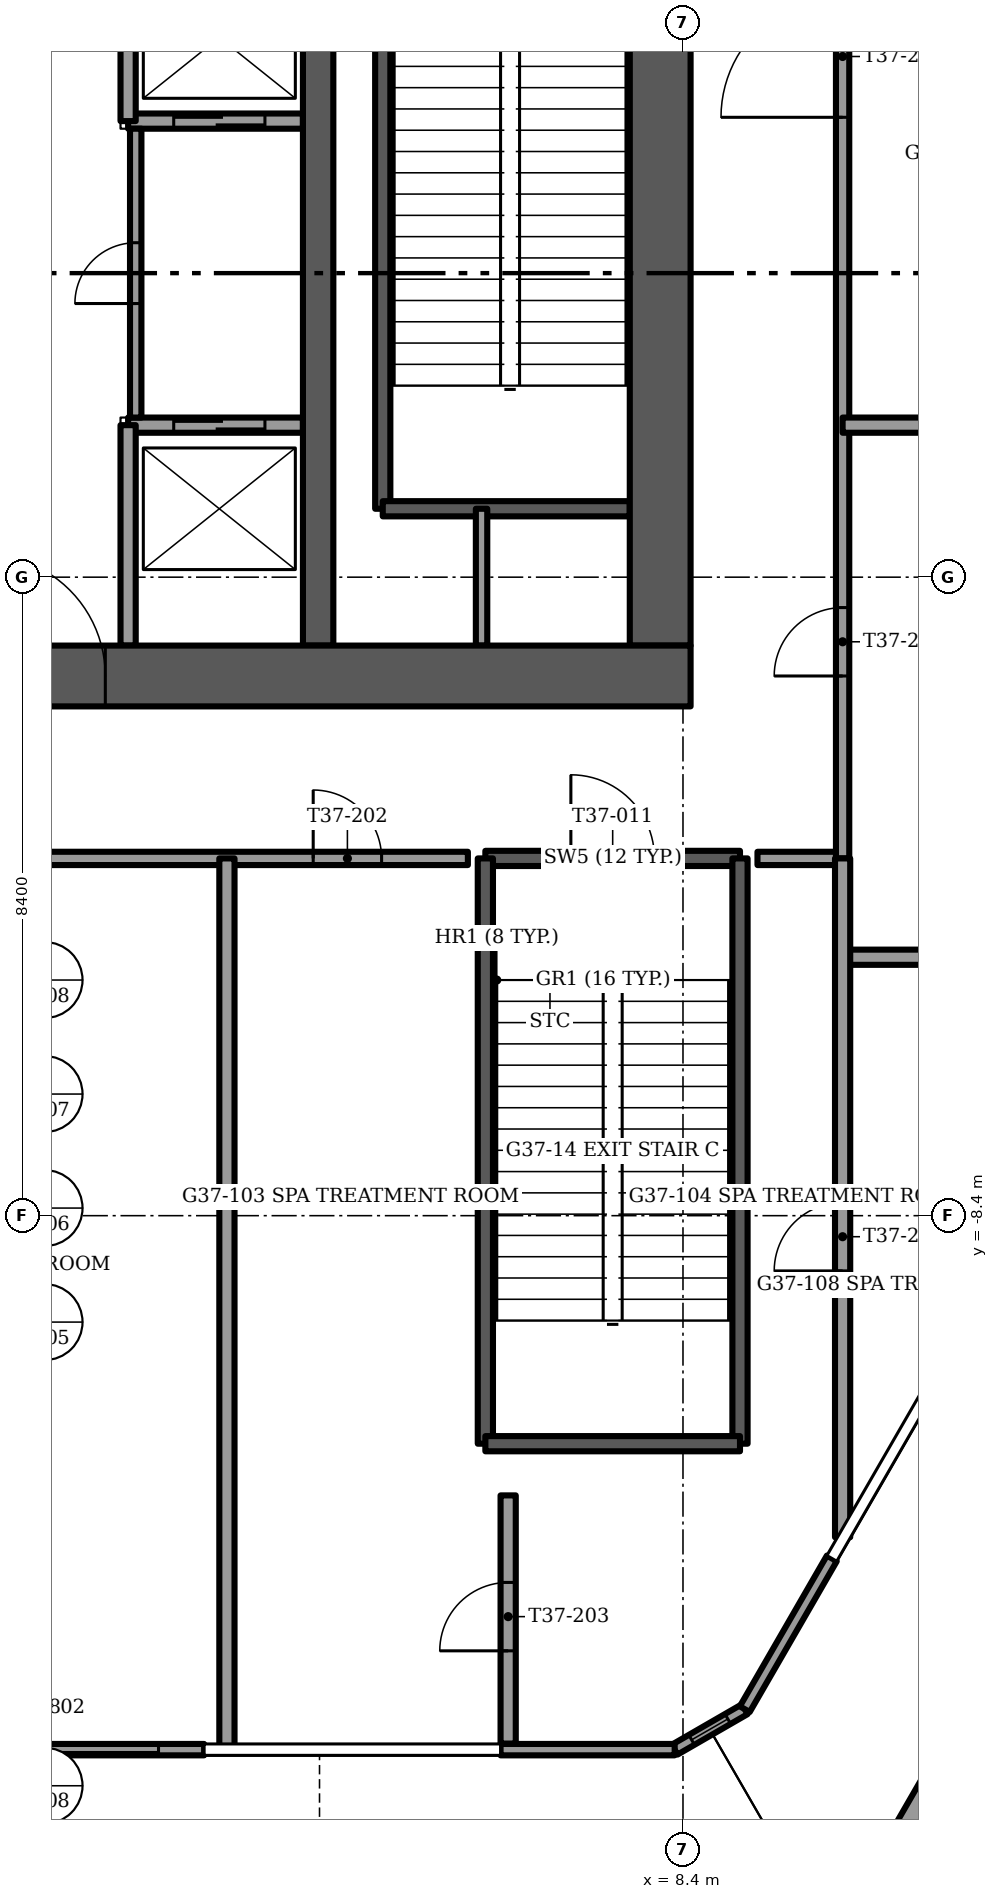
"""IFC4 building model, lengths in metres.
Left out: names, types, materials, properties, quantities, classifications, styles, units other than length and angle.
Written with IfcOpenShell. Run it as: python <this file> out.ifc"""

import sys

from ifc_helpers import new_model, si_unit, direction, frame, frame_2d, origin, place, context, subcontext, project, spatial, rectangle, extrude, element, fill, save


model = new_model("IFC4")
c1 = context("Model", 3, precision=1e-05, world=origin(), true_north=direction((0.0, 1.0)))
c2 = subcontext(c1, "Body", "Model", "MODEL_VIEW")
j1 = project(units=[si_unit("LENGTHUNIT", "METRE"), si_unit("PLANEANGLEUNIT", "RADIAN")], contexts=[c1])
p1 = place(None, origin())
s1 = spatial("IfcSite", under=j1, at=p1, CompositionType="ELEMENT")
p2 = place(p1, origin())
s2 = spatial("IfcBuilding", under=s1, at=p2, CompositionType="ELEMENT")
p3 = place(p2, frame((0.0, 0.0, 151.0)))
s3 = spatial("IfcBuildingStorey", under=s2, at=p3, CompositionType="ELEMENT", Elevation=151.0)
p4 = place(p3, frame((-8.5, -1.3, -0.3), z_axis=(0.0, 0.0, 1.0), x_axis=(1.0, 0.0, 0.0)))
e1 = element("IfcWall", 1, at=p4, inside=s3, PredefinedType="SHEAR", context=c2, shape_type="SweptSolid", body=[
    extrude(rectangle(XDim=17.0, YDim=0.8, at=frame_2d((8.5, 0.0))), origin(), (0.0, 0.0, 1.0), 6.0),
])
p5 = place(p4, frame((7.7, 0.0, 0.0)))
e2 = element("IfcOpeningElement", 2, at=p5, cuts=e1, PredefinedType="OPENING", context=c2, shape_type="SweptSolid", body=[
    extrude(rectangle(XDim=1.6, YDim=2.1, at=frame_2d((0.8, 1.05))), frame((0.0, 0.4, 0.0), z_axis=(0.0, -1.0, 0.0), x_axis=(1.0, 0.0, 0.0)), (0.0, 0.0, 1.0), 0.8),
])
p6 = place(p3, frame((8.1, -0.9, -0.3), z_axis=(0.0, 0.0, 1.0), x_axis=(0.0, 1.0, 0.0)))
e3 = element("IfcWall", 3, at=p6, inside=s3, PredefinedType="SHEAR", context=c2, shape_type="SweptSolid", body=[
    extrude(rectangle(XDim=9.8, YDim=0.8, at=frame_2d((4.9, 0.0))), origin(), (0.0, 0.0, 1.0), 6.0),
])
p7 = place(p6, frame((8.15, 0.0, 0.0)))
e4 = element("IfcOpeningElement", 4, at=p7, cuts=e3, PredefinedType="OPENING", context=c2, shape_type="SweptSolid", body=[
    extrude(rectangle(XDim=1.1, YDim=2.1, at=frame_2d((0.55, 1.05))), frame((0.0, 0.4, 0.0), z_axis=(0.0, -1.0, 0.0), x_axis=(1.0, 0.0, 0.0)), (0.0, 0.0, 1.0), 0.8),
])
p8 = place(p3, frame((3.6, -0.9, -0.3), z_axis=(0.0, 0.0, 1.0), x_axis=(0.0, 1.0, 0.0)))
e5 = element("IfcWall", 5, at=p8, inside=s3, PredefinedType="SHEAR", context=c2, shape_type="SweptSolid", body=[
    extrude(rectangle(XDim=9.8, YDim=0.4, at=frame_2d((4.9, 0.0))), origin(), (0.0, 0.0, 1.0), 6.0),
])
p9 = place(p3, frame((10.865, -17.88, 0.0), z_axis=(0.0, 0.0, 1.0), x_axis=(0.49998703478, 0.866032889128, 0.0)))
e6 = element("IfcWall", 6, at=p9, inside=s3, PredefinedType="PARAPET", context=c2, shape_type="SweptSolid", body=[
    extrude(rectangle(XDim=5.964, YDim=0.9, at=frame_2d((2.982, 0.0))), origin(), (0.0, 0.0, 1.0), 1.1),
])
p10 = place(p3, frame((-2.1, -15.425, 0.0), z_axis=(0.0, 0.0, 1.0), x_axis=(1.0, 0.0, 0.0)))
e7 = element("IfcWall", 7, at=p10, inside=s3, PredefinedType="SOLIDWALL", context=c2, shape_type="SweptSolid", body=[
    extrude(rectangle(XDim=4.2, YDim=0.15, at=frame_2d((2.1, 0.0))), origin(), (0.0, 0.0, 1.0), 5.7),
])
p11 = place(p10, frame((0.6, 0.0, 0.0)))
e8 = element("IfcOpeningElement", 8, at=p11, cuts=e7, PredefinedType="OPENING", context=c2, shape_type="SweptSolid", body=[
    extrude(rectangle(XDim=3.0, YDim=2.4, at=frame_2d((1.5, 1.2))), frame((0.0, 0.075, 0.0), z_axis=(0.0, -1.0, 0.0), x_axis=(1.0, 0.0, 0.0)), (0.0, 0.0, 1.0), 0.15),
])
for number, where, z_axis, x_axis in (
    (9, (6.0, -15.425, 0.0), (0.0, 0.0, 1.0), (1.0, 0.0, 0.0)),
    (10, (9.213, -14.893, 0.0), (0.0, 0.0, 1.0), (0.5, 0.866, 0.0)),
):
    element("IfcWall", number, at=place(p3, frame(where, z_axis=z_axis, x_axis=x_axis)), inside=s3, PredefinedType="SOLIDWALL", context=c2, shape_type="SweptSolid", body=[
        extrude(rectangle(XDim=2.291, YDim=0.15, at=frame_2d((1.146, 0.0))), origin(), (0.0, 0.0, 1.0), 5.7),
    ])
p12 = place(p3, frame((8.291, -15.425, 0.0), z_axis=(0.0, 0.0, 1.0), x_axis=(0.866048165231, 0.499960573946, 0.0)))
e11 = element("IfcWall", 11, at=p12, inside=s3, PredefinedType="SOLIDWALL", context=c2, shape_type="SweptSolid", body=[
    extrude(rectangle(XDim=1.065, YDim=0.15, at=frame_2d((0.532, 0.0))), origin(), (0.0, 0.0, 1.0), 5.7),
])
p13 = place(p12, frame((0.258, 0.0, 0.15)))
e12 = element("IfcOpeningElement", 12, at=p13, cuts=e11, PredefinedType="OPENING", context=c2, shape_type="SweptSolid", body=[
    extrude(rectangle(XDim=0.55, YDim=5.1, at=frame_2d((0.275, 2.55))), frame((0.0, 0.075, 0.0), z_axis=(0.0, -1.0, 0.0), x_axis=(1.0, 0.0, 0.0)), (0.0, 0.0, 1.0), 0.15),
])
p14 = place(p3, frame((1.1, 2.0, 0.0), z_axis=(0.0, 0.0, 1.0), x_axis=(1.0, 0.0, 0.0)))
e13 = element("IfcWall", 13, at=p14, inside=s3, PredefinedType="PARTITIONING", context=c2, shape_type="SweptSolid", body=[
    extrude(rectangle(XDim=2.3, YDim=0.2, at=frame_2d((1.15, 0.0))), origin(), (0.0, 0.0, 1.0), 5.7),
])
p15 = place(p14, frame((0.6, 0.0, 0.0)))
e14 = element("IfcOpeningElement", 14, at=p15, cuts=e13, PredefinedType="OPENING", context=c2, shape_type="SweptSolid", body=[
    extrude(rectangle(XDim=1.2, YDim=2.1, at=frame_2d((0.6, 1.05))), frame((0.0, 0.1, 0.0), z_axis=(0.0, -1.0, 0.0), x_axis=(1.0, 0.0, 0.0)), (0.0, 0.0, 1.0), 0.2),
])
p16 = place(p3, frame((1.1, 6.0, 0.0), z_axis=(0.0, 0.0, 1.0), x_axis=(1.0, 0.0, 0.0)))
e15 = element("IfcWall", 15, at=p16, inside=s3, PredefinedType="PARTITIONING", context=c2, shape_type="SweptSolid", body=[
    extrude(rectangle(XDim=2.3, YDim=0.2, at=frame_2d((1.15, 0.0))), origin(), (0.0, 0.0, 1.0), 5.7),
])
p17 = place(p16, frame((0.6, 0.0, 0.0)))
e16 = element("IfcOpeningElement", 16, at=p17, cuts=e15, PredefinedType="OPENING", context=c2, shape_type="SweptSolid", body=[
    extrude(rectangle(XDim=1.2, YDim=2.1, at=frame_2d((0.6, 1.05))), frame((0.0, 0.1, 0.0), z_axis=(0.0, -1.0, 0.0), x_axis=(1.0, 0.0, 0.0)), (0.0, 0.0, 1.0), 0.2),
])
for number, where, z_axis, x_axis in (
    (17, (1.1, -0.9, 0.0), (0.0, 0.0, 1.0), (0.0, 1.0, 0.0)),
    (18, (1.1, 6.0, 0.0), (0.0, 0.0, 1.0), (0.0, 1.0, 0.0)),
):
    element("IfcWall", number, at=place(p3, frame(where, z_axis=z_axis, x_axis=x_axis)), inside=s3, PredefinedType="PARTITIONING", context=c2, shape_type="SweptSolid", body=[
        extrude(rectangle(XDim=2.9, YDim=0.2, at=frame_2d((1.45, 0.0))), origin(), (0.0, 0.0, 1.0), 5.7),
    ])
p18 = place(p3, frame((4.45, 0.9, -0.3), z_axis=(0.0, 0.0, 1.0), x_axis=(0.0, 1.0, 0.0)))
e19 = element("IfcWall", 19, at=p18, inside=s3, PredefinedType="SOLIDWALL", context=c2, shape_type="SweptSolid", body=[
    extrude(rectangle(XDim=8.0, YDim=0.2, at=frame_2d((4.0, 0.0))), origin(), (0.0, 0.0, 1.0), 6.0),
])
p19 = place(p3, frame((4.45, 0.9, -0.3), z_axis=(0.0, 0.0, 1.0), x_axis=(1.0, 0.0, 0.0)))
e20 = element("IfcWall", 20, at=p19, inside=s3, PredefinedType="SOLIDWALL", context=c2, shape_type="SweptSolid", body=[
    extrude(rectangle(XDim=3.25, YDim=0.2, at=frame_2d((1.625, 0.0))), origin(), (0.0, 0.0, 1.0), 6.0),
])
p20 = place(p3, frame((5.75, -0.9, 0.0), z_axis=(0.0, 0.0, 1.0), x_axis=(0.0, 1.0, 0.0)))
e21 = element("IfcWall", 21, at=p20, inside=s3, PredefinedType="PARTITIONING", context=c2, shape_type="SweptSolid", body=[
    extrude(rectangle(XDim=1.8, YDim=0.15, at=frame_2d((0.9, 0.0))), origin(), (0.0, 0.0, 1.0), 5.7),
])
p21 = place(p3, frame((5.8, -3.7, -0.3), z_axis=(0.0, 0.0, 1.0), x_axis=(1.0, 0.0, 0.0)))
e22 = element("IfcWall", 22, at=p21, inside=s3, PredefinedType="SOLIDWALL", context=c2, shape_type="SweptSolid", body=[
    extrude(rectangle(XDim=3.35, YDim=0.2, at=frame_2d((1.675, 0.0))), origin(), (0.0, 0.0, 1.0), 6.0),
])
p22 = place(p21, frame((1.125, 0.0, 0.0)))
e23 = element("IfcOpeningElement", 23, at=p22, cuts=e22, PredefinedType="OPENING", context=c2, shape_type="SweptSolid", body=[
    extrude(rectangle(XDim=1.1, YDim=2.1, at=frame_2d((0.55, 1.05))), frame((0.0, 0.1, 0.0), z_axis=(0.0, -1.0, 0.0), x_axis=(1.0, 0.0, 0.0)), (0.0, 0.0, 1.0), 0.2),
])
for number, where, z_axis, x_axis in (
    (24, (5.8, -3.7, -0.3), (0.0, 0.0, 1.0), (0.0, -1.0, 0.0)),
    (25, (9.15, -3.7, -0.3), (0.0, 0.0, 1.0), (0.0, -1.0, 0.0)),
):
    element("IfcWall", number, at=place(p3, frame(where, z_axis=z_axis, x_axis=x_axis)), inside=s3, PredefinedType="SOLIDWALL", context=c2, shape_type="SweptSolid", body=[
        extrude(rectangle(XDim=7.7, YDim=0.2, at=frame_2d((3.85, 0.0))), origin(), (0.0, 0.0, 1.0), 6.0),
    ])
p23 = place(p3, frame((5.8, -11.4, -0.3), z_axis=(0.0, 0.0, 1.0), x_axis=(1.0, 0.0, 0.0)))
e26 = element("IfcWall", 26, at=p23, inside=s3, PredefinedType="SOLIDWALL", context=c2, shape_type="SweptSolid", body=[
    extrude(rectangle(XDim=3.35, YDim=0.2, at=frame_2d((1.675, 0.0))), origin(), (0.0, 0.0, 1.0), 6.0),
])
p24 = place(p3, frame((1.2, 2.1, 0.0), z_axis=(0.0, 0.0, 1.0), x_axis=(0.0, 1.0, 0.0)))
e27 = element("IfcWall", 27, at=p24, inside=s3, PredefinedType="PARTITIONING", context=c2, shape_type="SweptSolid", body=[
    extrude(rectangle(XDim=3.8, YDim=0.15, at=frame_2d((1.9, 0.0))), origin(), (0.0, 0.0, 1.0), 5.7),
])
p25 = place(p24, frame((1.5, 0.0, 0.0)))
e28 = element("IfcOpeningElement", 28, at=p25, cuts=e27, PredefinedType="OPENING", context=c2, shape_type="SweptSolid", body=[
    extrude(rectangle(XDim=0.8, YDim=2.1, at=frame_2d((0.4, 1.05))), frame((0.0, 0.075, 0.0), z_axis=(0.0, -1.0, 0.0), x_axis=(1.0, 0.0, 0.0)), (0.0, 0.0, 1.0), 0.15),
])
p26 = place(p3, frame((-5.57, -3.7, 0.0), z_axis=(0.0, 0.0, 1.0), x_axis=(1.0, 0.0, 0.0)))
e29 = element("IfcWall", 29, at=p26, inside=s3, PredefinedType="PARTITIONING", context=c2, shape_type="SweptSolid", body=[
    extrude(rectangle(XDim=11.14, YDim=0.175, at=frame_2d((5.57, 0.0))), origin(), (0.0, 0.0, 1.0), 5.7),
])
p27 = place(p26, frame((3.535, 0.0, 0.0)))
e30 = element("IfcOpeningElement", 30, at=p27, cuts=e29, PredefinedType="OPENING", context=c2, shape_type="SweptSolid", body=[
    extrude(rectangle(XDim=0.9, YDim=2.1, at=frame_2d((0.45, 1.05))), frame((0.0, 0.087, 0.0), z_axis=(0.0, -1.0, 0.0), x_axis=(1.0, 0.0, 0.0)), (0.0, 0.0, 1.0), 0.175),
])
p28 = place(p26, frame((9.105, 0.0, 0.0)))
e31 = element("IfcOpeningElement", 31, at=p28, cuts=e29, PredefinedType="OPENING", context=c2, shape_type="SweptSolid", body=[
    extrude(rectangle(XDim=0.9, YDim=2.1, at=frame_2d((0.45, 1.05))), frame((0.0, 0.087, 0.0), z_axis=(0.0, -1.0, 0.0), x_axis=(1.0, 0.0, 0.0)), (0.0, 0.0, 1.0), 0.175),
])
p29 = place(p3, frame((9.38, -3.7, 0.0), z_axis=(0.0, 0.0, 1.0), x_axis=(1.0, 0.0, 0.0)))
e32 = element("IfcWall", 32, at=p29, inside=s3, PredefinedType="PARTITIONING", context=c2, shape_type="SweptSolid", body=[
    extrude(rectangle(XDim=1.12, YDim=0.175, at=frame_2d((0.56, 0.0))), origin(), (0.0, 0.0, 1.0), 5.7),
])
p30 = place(p3, frame((10.5, -3.7, 0.0), z_axis=(0.0, 0.0, 1.0), x_axis=(0.0, 1.0, 0.0)))
e33 = element("IfcWall", 33, at=p30, inside=s3, PredefinedType="PARTITIONING", context=c2, shape_type="SweptSolid", body=[
    extrude(rectangle(XDim=16.33, YDim=0.175, at=frame_2d((8.165, 0.0))), origin(), (0.0, 0.0, 1.0), 5.7),
])
p31 = place(p30, frame((2.4, 0.0, 0.0)))
e34 = element("IfcOpeningElement", 34, at=p31, cuts=e33, PredefinedType="OPENING", context=c2, shape_type="SweptSolid", body=[
    extrude(rectangle(XDim=0.9, YDim=2.1, at=frame_2d((0.45, 1.05))), frame((0.0, 0.087, 0.0), z_axis=(0.0, -1.0, 0.0), x_axis=(1.0, 0.0, 0.0)), (0.0, 0.0, 1.0), 0.175),
])
p32 = place(p30, frame((9.75, 0.0, 0.0)))
e35 = element("IfcOpeningElement", 35, at=p32, cuts=e33, PredefinedType="OPENING", context=c2, shape_type="SweptSolid", body=[
    extrude(rectangle(XDim=1.6, YDim=2.1, at=frame_2d((0.8, 1.05))), frame((0.0, 0.087, 0.0), z_axis=(0.0, -1.0, 0.0), x_axis=(1.0, 0.0, 0.0)), (0.0, 0.0, 1.0), 0.175),
])
p33 = place(p3, frame((10.5, -5.0, 0.0), z_axis=(0.0, 0.0, 1.0), x_axis=(1.0, 0.0, 0.0)))
e36 = element("IfcWall", 36, at=p33, inside=s3, PredefinedType="PARTITIONING", context=c2, shape_type="SweptSolid", body=[
    extrude(rectangle(XDim=4.403, YDim=0.2, at=frame_2d((2.202, 0.0))), origin(), (0.0, 0.0, 1.0), 5.7),
])
p34 = place(p3, frame((10.5, 2.0, 0.0), z_axis=(0.0, 0.0, 1.0), x_axis=(1.0, 0.0, 0.0)))
e37 = element("IfcWall", 37, at=p34, inside=s3, PredefinedType="PARTITIONING", context=c2, shape_type="SweptSolid", body=[
    extrude(rectangle(XDim=6.065, YDim=0.2, at=frame_2d((3.032, 0.0))), origin(), (0.0, 0.0, 1.0), 5.7),
])
p35 = place(p3, frame((2.4, -15.406, 0.0), z_axis=(0.0, 0.0, 1.0), x_axis=(0.0, 1.0, 0.0)))
e38 = element("IfcWall", 38, at=p35, inside=s3, PredefinedType="PARTITIONING", context=c2, shape_type="SweptSolid", body=[
    extrude(rectangle(XDim=11.706, YDim=0.2, at=frame_2d((5.853, 0.0))), origin(), (0.0, 0.0, 1.0), 5.7),
])
p36 = place(p3, frame((6.1, -15.345, 0.0), z_axis=(0.0, 0.0, 1.0), x_axis=(0.0, 1.0, 0.0)))
e39 = element("IfcWall", 39, at=p36, inside=s3, PredefinedType="PARTITIONING", context=c2, shape_type="SweptSolid", body=[
    extrude(rectangle(XDim=3.265, YDim=0.2, at=frame_2d((1.632, 0.0))), origin(), (0.0, 0.0, 1.0), 5.7),
])
p37 = place(p36, frame((1.22, 0.0, 0.0)))
e40 = element("IfcOpeningElement", 40, at=p37, cuts=e39, PredefinedType="OPENING", context=c2, shape_type="SweptSolid", body=[
    extrude(rectangle(XDim=0.9, YDim=2.1, at=frame_2d((0.45, 1.05))), frame((0.0, 0.1, 0.0), z_axis=(0.0, -1.0, 0.0), x_axis=(1.0, 0.0, 0.0)), (0.0, 0.0, 1.0), 0.2),
])
p38 = place(p3, frame((10.5, -12.63, 0.0), z_axis=(0.0, 0.0, 1.0), x_axis=(0.0, 1.0, 0.0)))
e41 = element("IfcWall", 41, at=p38, inside=s3, PredefinedType="PARTITIONING", context=c2, shape_type="SweptSolid", body=[
    extrude(rectangle(XDim=8.93, YDim=0.2, at=frame_2d((4.465, 0.0))), origin(), (0.0, 0.0, 1.0), 5.7),
])
p39 = place(p38, frame((3.504, 0.0, 0.0)))
e42 = element("IfcOpeningElement", 42, at=p39, cuts=e41, PredefinedType="OPENING", context=c2, shape_type="SweptSolid", body=[
    extrude(rectangle(XDim=0.9, YDim=2.1, at=frame_2d((0.45, 1.05))), frame((0.0, 0.1, 0.0), z_axis=(0.0, -1.0, 0.0), x_axis=(1.0, 0.0, 0.0)), (0.0, 0.0, 1.0), 0.2),
])
p40 = place(p11, origin())
e43 = element("IfcDoor", 43, at=p40, inside=s3, OperationType="SLIDING_TO_RIGHT", PredefinedType="DOOR", context=c2, shape_type="SweptSolid", body=[
    extrude(rectangle(XDim=3.0, YDim=2.4, at=frame_2d((1.5, 1.2))), frame((0.0, 0.025, 0.0), z_axis=(0.0, -1.0, 0.0), x_axis=(1.0, 0.0, 0.0)), (0.0, 0.0, 1.0), 0.05),
])
fill(e8, e43)
p41 = place(p13, origin())
e44 = element("IfcWindow", 44, at=p41, inside=s3, PartitioningType="SINGLE_PANEL", PredefinedType="WINDOW", context=c2, shape_type="SweptSolid", body=[
    extrude(rectangle(XDim=0.55, YDim=5.1, at=frame_2d((0.275, 2.55))), frame((0.0, 0.03, 0.0), z_axis=(0.0, -1.0, 0.0), x_axis=(1.0, 0.0, 0.0)), (0.0, 0.0, 1.0), 0.06),
])
fill(e12, e44)
p42 = place(p15, origin())
e45 = element("IfcDoor", 45, at=p42, inside=s3, OperationType="SLIDING_TO_LEFT", PredefinedType="DOOR", context=c2, shape_type="SweptSolid", body=[
    extrude(rectangle(XDim=1.2, YDim=2.1, at=frame_2d((0.6, 1.05))), frame((0.0, 0.025, 0.0), z_axis=(0.0, -1.0, 0.0), x_axis=(1.0, 0.0, 0.0)), (0.0, 0.0, 1.0), 0.05),
])
fill(e14, e45)
p43 = place(p17, origin())
e46 = element("IfcDoor", 46, at=p43, inside=s3, OperationType="SLIDING_TO_LEFT", PredefinedType="DOOR", context=c2, shape_type="SweptSolid", body=[
    extrude(rectangle(XDim=1.2, YDim=2.1, at=frame_2d((0.6, 1.05))), frame((0.0, 0.025, 0.0), z_axis=(0.0, -1.0, 0.0), x_axis=(1.0, 0.0, 0.0)), (0.0, 0.0, 1.0), 0.05),
])
fill(e16, e46)
p44 = place(p5, origin())
e47 = element("IfcDoor", 47, at=p44, inside=s3, OperationType="DOUBLE_DOOR_SINGLE_SWING", PredefinedType="DOOR", context=c2, shape_type="SweptSolid", body=[
    extrude(rectangle(XDim=1.6, YDim=2.1, at=frame_2d((0.8, 1.05))), frame((0.0, 0.025, 0.0), z_axis=(0.0, -1.0, 0.0), x_axis=(1.0, 0.0, 0.0)), (0.0, 0.0, 1.0), 0.05),
])
fill(e2, e47)
p45 = place(p22, origin())
e48 = element("IfcDoor", 48, at=p45, inside=s3, OperationType="SINGLE_SWING_LEFT", PredefinedType="DOOR", context=c2, shape_type="SweptSolid", body=[
    extrude(rectangle(XDim=1.1, YDim=2.1, at=frame_2d((0.55, 1.05))), frame((0.0, 0.025, 0.0), z_axis=(0.0, -1.0, 0.0), x_axis=(1.0, 0.0, 0.0)), (0.0, 0.0, 1.0), 0.05),
])
fill(e23, e48)
p46 = place(p25, origin())
e49 = element("IfcDoor", 49, at=p46, inside=s3, OperationType="SINGLE_SWING_RIGHT", PredefinedType="DOOR", context=c2, shape_type="SweptSolid", body=[
    extrude(rectangle(XDim=0.8, YDim=2.1, at=frame_2d((0.4, 1.05))), frame((0.0, 0.025, 0.0), z_axis=(0.0, -1.0, 0.0), x_axis=(1.0, 0.0, 0.0)), (0.0, 0.0, 1.0), 0.05),
])
fill(e28, e49)
p47 = place(p28, origin())
e50 = element("IfcDoor", 50, at=p47, inside=s3, OperationType="SINGLE_SWING_RIGHT", PredefinedType="DOOR", context=c2, shape_type="SweptSolid", body=[
    extrude(rectangle(XDim=0.9, YDim=2.1, at=frame_2d((0.45, 1.05))), frame((0.0, 0.025, 0.0), z_axis=(0.0, -1.0, 0.0), x_axis=(1.0, 0.0, 0.0)), (0.0, 0.0, 1.0), 0.05),
])
fill(e31, e50)
p48 = place(p37, origin())
e51 = element("IfcDoor", 51, at=p48, inside=s3, OperationType="SINGLE_SWING_LEFT", PredefinedType="DOOR", context=c2, shape_type="SweptSolid", body=[
    extrude(rectangle(XDim=0.9, YDim=2.1, at=frame_2d((0.45, 1.05))), frame((0.0, 0.025, 0.0), z_axis=(0.0, -1.0, 0.0), x_axis=(1.0, 0.0, 0.0)), (0.0, 0.0, 1.0), 0.05),
])
fill(e40, e51)
p49 = place(p39, origin())
e52 = element("IfcDoor", 52, at=p49, inside=s3, OperationType="SINGLE_SWING_LEFT", PredefinedType="DOOR", context=c2, shape_type="SweptSolid", body=[
    extrude(rectangle(XDim=0.9, YDim=2.1, at=frame_2d((0.45, 1.05))), frame((0.0, 0.025, 0.0), z_axis=(0.0, -1.0, 0.0), x_axis=(1.0, 0.0, 0.0)), (0.0, 0.0, 1.0), 0.05),
])
fill(e42, e52)
p50 = place(p31, origin())
e53 = element("IfcDoor", 53, at=p50, inside=s3, OperationType="SINGLE_SWING_RIGHT", PredefinedType="DOOR", context=c2, shape_type="SweptSolid", body=[
    extrude(rectangle(XDim=0.9, YDim=2.1, at=frame_2d((0.45, 1.05))), frame((0.0, 0.025, 0.0), z_axis=(0.0, -1.0, 0.0), x_axis=(1.0, 0.0, 0.0)), (0.0, 0.0, 1.0), 0.05),
])
fill(e34, e53)
p51 = place(p32, origin())
e54 = element("IfcDoor", 54, at=p51, inside=s3, OperationType="DOUBLE_DOOR_SINGLE_SWING", PredefinedType="DOOR", context=c2, shape_type="SweptSolid", body=[
    extrude(rectangle(XDim=1.6, YDim=2.1, at=frame_2d((0.8, 1.05))), frame((0.0, 0.025, 0.0), z_axis=(0.0, -1.0, 0.0), x_axis=(1.0, 0.0, 0.0)), (0.0, 0.0, 1.0), 0.05),
])
fill(e35, e54)
save(model, sys.argv[1])
